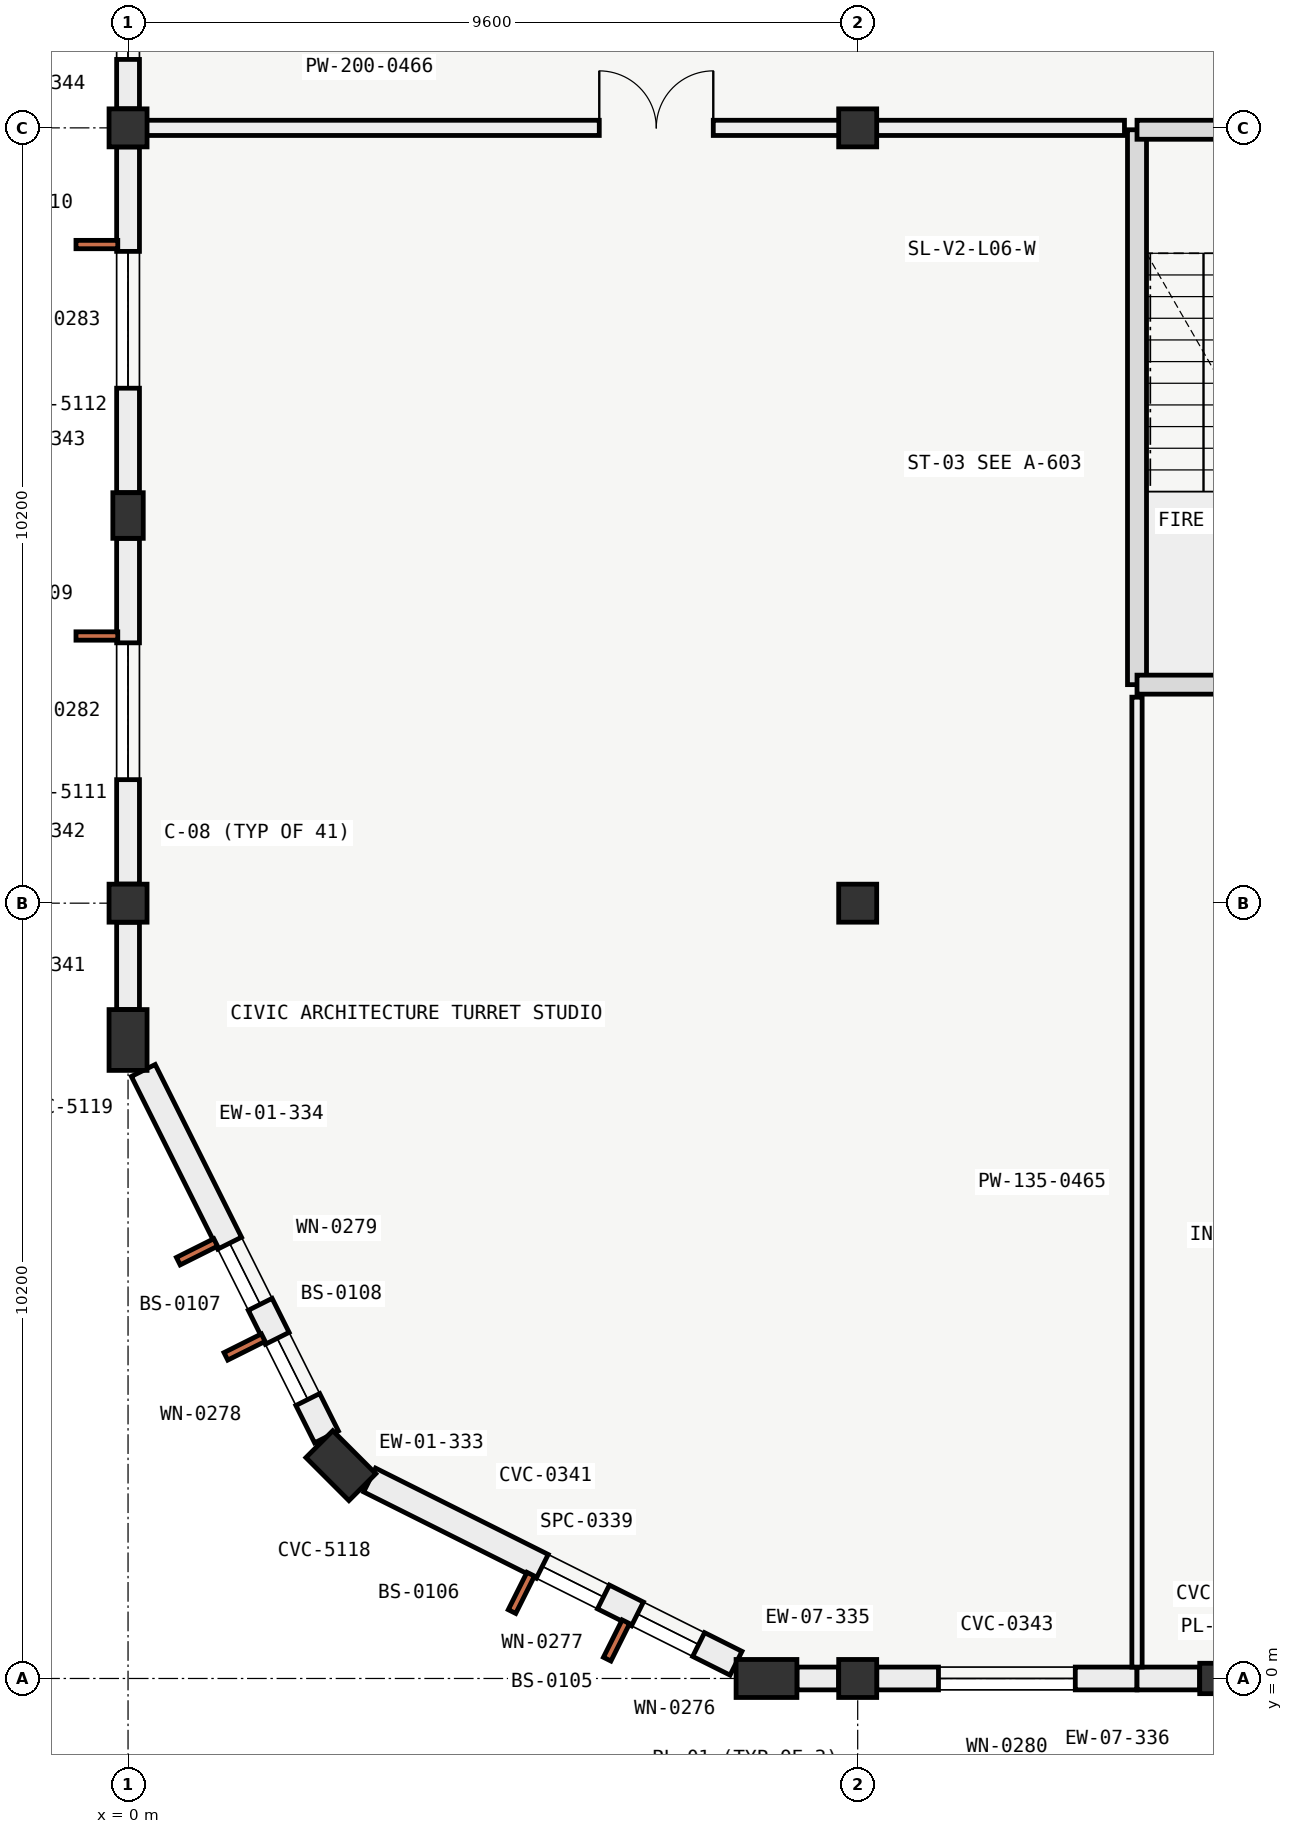
"""IFC4 building model, lengths in metres.
Left out: names, types, materials, properties, quantities, classifications, styles, units other than length and angle.
Written with IfcOpenShell. Run it as: python <this file> out.ifc"""

import sys

from ifc_helpers import new_model, si_unit, direction, frame, frame_2d, origin, origin_2d, place, context, subcontext, project, spatial, rectangle, extrude, element, fill, save


model = new_model("IFC4")
c1 = context("Model", 3, precision=1e-05, world=origin(), true_north=direction((0.0, 1.0)))
c2 = subcontext(c1, "Body", "Model", "MODEL_VIEW")
j1 = project(units=[si_unit("LENGTHUNIT", "METRE"), si_unit("PLANEANGLEUNIT", "RADIAN")], contexts=[c1])
p1 = place(None, origin())
s1 = spatial("IfcSite", under=j1, at=p1, CompositionType="ELEMENT")
p2 = place(p1, origin())
s2 = spatial("IfcBuilding", under=s1, at=p2, CompositionType="ELEMENT")
p3 = place(p2, frame((0.0, 0.0, 26.4)))
s3 = spatial("IfcBuildingStorey", under=s2, at=p3, CompositionType="ELEMENT", Elevation=26.4)
for number, where, z_axis, x_axis in (
    (1, (0.0, 10.2, 0.0), (0.0, 0.0, 1.0), (1.0, 0.0, 0.0)),
    (2, (0.0, 20.4, 0.0), (0.0, 0.0, 1.0), (1.0, 0.0, 0.0)),
    (3, (9.6, 0.0, 0.0), (0.0, 0.0, 1.0), (1.0, 0.0, 0.0)),
    (4, (9.6, 10.2, 0.0), (0.0, 0.0, 1.0), (1.0, 0.0, 0.0)),
    (5, (9.6, 20.4, 0.0), (0.0, 0.0, 1.0), (1.0, 0.0, 0.0)),
):
    element("IfcColumn", number, at=place(p3, frame(where, z_axis=z_axis, x_axis=x_axis)), inside=s3, PredefinedType="COLUMN", context=c2, shape_type="SweptSolid", body=[
        extrude(rectangle(XDim=0.5, YDim=0.5, at=origin_2d()), origin(), (0.0, 0.0, 1.0), 4.2),
    ])
for number, where, z_axis, x_axis in (
    (6, (8.4, 0.0, 0.0), (0.0, 0.0, 1.0), (0.0, 1.0, 0.0)),
    (7, (2.8, 2.8, 0.0), (0.0, 0.0, 1.0), (0.707, 0.707, 0.0)),
    (8, (0.0, 8.4, 0.0), (0.0, 0.0, 1.0), (1.0, 0.0, 0.0)),
):
    element("IfcColumn", number, at=place(p3, frame(where, z_axis=z_axis, x_axis=x_axis)), inside=s3, PredefinedType="PILASTER", context=c2, shape_type="SweptSolid", body=[
        extrude(rectangle(XDim=0.5, YDim=0.8, at=origin_2d()), origin(), (0.0, 0.0, 1.0), 4.2),
    ])
for number, where, z_axis, x_axis in (
    (9, (14.4, 0.0, 0.0), (0.0, 0.0, 1.0), (0.0, 1.0, 0.0)),
    (10, (0.0, 15.3, 0.0), (0.0, 0.0, 1.0), (1.0, 0.0, 0.0)),
):
    element("IfcColumn", number, at=place(p3, frame(where, z_axis=z_axis, x_axis=x_axis)), inside=s3, PredefinedType="PILASTER", context=c2, shape_type="SweptSolid", body=[
        extrude(rectangle(XDim=0.4, YDim=0.6, at=origin_2d()), origin(), (0.0, 0.0, 1.0), 4.2),
    ])
p4 = place(p3, frame((7.999, 0.2, 0.0), z_axis=(0.0, 0.0, 1.0), x_axis=(-0.894418132042, 0.447231712958, 0.0)))
e11 = element("IfcWall", 11, at=p4, inside=s3, PredefinedType="SOLIDWALL", context=c2, shape_type="SweptSolid", body=[
    extrude(rectangle(XDim=5.39, YDim=0.35, at=frame_2d((2.695, 0.0))), origin(), (0.0, 0.0, 1.0), 3.25),
])
p5 = place(p4, frame((0.55, 0.0, 0.7)))
e12 = element("IfcOpeningElement", 12, at=p5, cuts=e11, PredefinedType="OPENING", context=c2, shape_type="SweptSolid", body=[
    extrude(rectangle(XDim=0.9, YDim=2.2, at=frame_2d((0.45, 1.1))), frame((0.0, 0.185, 0.0), z_axis=(0.0, -1.0, 0.0), x_axis=(1.0, 0.0, 0.0)), (0.0, 0.0, 1.0), 0.37),
])
p6 = place(p4, frame((1.95, 0.0, 0.7)))
e13 = element("IfcOpeningElement", 13, at=p6, cuts=e11, PredefinedType="OPENING", context=c2, shape_type="SweptSolid", body=[
    extrude(rectangle(XDim=0.9, YDim=2.2, at=frame_2d((0.45, 1.1))), frame((0.0, 0.185, 0.0), z_axis=(0.0, -1.0, 0.0), x_axis=(1.0, 0.0, 0.0)), (0.0, 0.0, 1.0), 0.37),
])
p7 = place(p3, frame((2.611, 3.178, 0.0), z_axis=(0.0, 0.0, 1.0), x_axis=(-0.447231712958, 0.894418132042, 0.0)))
e14 = element("IfcWall", 14, at=p7, inside=s3, PredefinedType="SOLIDWALL", context=c2, shape_type="SweptSolid", body=[
    extrude(rectangle(XDim=5.39, YDim=0.35, at=frame_2d((2.695, 0.0))), origin(), (0.0, 0.0, 1.0), 3.25),
])
p8 = place(p7, frame((0.55, 0.0, 0.7)))
e15 = element("IfcOpeningElement", 15, at=p8, cuts=e14, PredefinedType="OPENING", context=c2, shape_type="SweptSolid", body=[
    extrude(rectangle(XDim=0.9, YDim=2.2, at=frame_2d((0.45, 1.1))), frame((0.0, 0.185, 0.0), z_axis=(0.0, -1.0, 0.0), x_axis=(1.0, 0.0, 0.0)), (0.0, 0.0, 1.0), 0.37),
])
p9 = place(p7, frame((1.95, 0.0, 0.7)))
e16 = element("IfcOpeningElement", 16, at=p9, cuts=e14, PredefinedType="OPENING", context=c2, shape_type="SweptSolid", body=[
    extrude(rectangle(XDim=0.9, YDim=2.2, at=frame_2d((0.45, 1.1))), frame((0.0, 0.185, 0.0), z_axis=(0.0, -1.0, 0.0), x_axis=(1.0, 0.0, 0.0)), (0.0, 0.0, 1.0), 0.37),
])
p10 = place(p3, frame((9.349, 0.0, 0.0), z_axis=(0.0, 0.0, 1.0), x_axis=(-1.0, 0.0, 0.0)))
e17 = element("IfcWall", 17, at=p10, inside=s3, PredefinedType="SOLIDWALL", context=c2, shape_type="SweptSolid", body=[
    extrude(rectangle(XDim=0.548, YDim=0.3, at=frame_2d((0.274, 0.0))), origin(), (0.0, 0.0, 1.0), 3.25),
])
p11 = place(p3, frame((13.275, 0.0, 0.0), z_axis=(0.0, 0.0, 1.0), x_axis=(-1.0, 0.0, 0.0)))
e18 = element("IfcWall", 18, at=p11, inside=s3, PredefinedType="SOLIDWALL", context=c2, shape_type="SweptSolid", body=[
    extrude(rectangle(XDim=3.424, YDim=0.3, at=frame_2d((1.712, 0.0))), origin(), (0.0, 0.0, 1.0), 3.25),
])
p12 = place(p11, frame((0.812, 0.0, 0.8)))
e19 = element("IfcOpeningElement", 19, at=p12, cuts=e18, PredefinedType="OPENING", context=c2, shape_type="SweptSolid", body=[
    extrude(rectangle(XDim=1.8, YDim=2.1, at=frame_2d((0.9, 1.05))), frame((0.0, 0.16, 0.0), z_axis=(0.0, -1.0, 0.0), x_axis=(1.0, 0.0, 0.0)), (0.0, 0.0, 1.0), 0.32),
])
p13 = place(p3, frame((14.099, 0.0, 0.0), z_axis=(0.0, 0.0, 1.0), x_axis=(-1.0, 0.0, 0.0)))
e20 = element("IfcWall", 20, at=p13, inside=s3, PredefinedType="SOLIDWALL", context=c2, shape_type="SweptSolid", body=[
    extrude(rectangle(XDim=0.824, YDim=0.3, at=frame_2d((0.412, 0.0))), origin(), (0.0, 0.0, 1.0), 3.25),
])
p14 = place(p3, frame((0.0, 8.801, 0.0), z_axis=(0.0, 0.0, 1.0), x_axis=(0.0, 1.0, 0.0)))
e21 = element("IfcWall", 21, at=p14, inside=s3, PredefinedType="SOLIDWALL", context=c2, shape_type="SweptSolid", body=[
    extrude(rectangle(XDim=1.148, YDim=0.3, at=frame_2d((0.574, 0.0))), origin(), (0.0, 0.0, 1.0), 3.25),
])
p15 = place(p3, frame((0.0, 10.451, 0.0), z_axis=(0.0, 0.0, 1.0), x_axis=(0.0, 1.0, 0.0)))
e22 = element("IfcWall", 22, at=p15, inside=s3, PredefinedType="SOLIDWALL", context=c2, shape_type="SweptSolid", body=[
    extrude(rectangle(XDim=4.548, YDim=0.3, at=frame_2d((2.274, 0.0))), origin(), (0.0, 0.0, 1.0), 3.25),
])
p16 = place(p15, frame((1.374, 0.0, 0.85)))
e23 = element("IfcOpeningElement", 23, at=p16, cuts=e22, PredefinedType="OPENING", context=c2, shape_type="SweptSolid", body=[
    extrude(rectangle(XDim=1.8, YDim=2.1, at=frame_2d((0.9, 1.05))), frame((0.0, 0.16, 0.0), z_axis=(0.0, -1.0, 0.0), x_axis=(1.0, 0.0, 0.0)), (0.0, 0.0, 1.0), 0.32),
])
p17 = place(p3, frame((0.0, 15.601, 0.0), z_axis=(0.0, 0.0, 1.0), x_axis=(0.0, 1.0, 0.0)))
e24 = element("IfcWall", 24, at=p17, inside=s3, PredefinedType="SOLIDWALL", context=c2, shape_type="SweptSolid", body=[
    extrude(rectangle(XDim=4.548, YDim=0.3, at=frame_2d((2.274, 0.0))), origin(), (0.0, 0.0, 1.0), 3.25),
])
p18 = place(p17, frame((1.374, 0.0, 0.85)))
e25 = element("IfcOpeningElement", 25, at=p18, cuts=e24, PredefinedType="OPENING", context=c2, shape_type="SweptSolid", body=[
    extrude(rectangle(XDim=1.8, YDim=2.1, at=frame_2d((0.9, 1.05))), frame((0.0, 0.16, 0.0), z_axis=(0.0, -1.0, 0.0), x_axis=(1.0, 0.0, 0.0)), (0.0, 0.0, 1.0), 0.32),
])
p19 = place(p3, frame((0.0, 20.651, 0.0), z_axis=(0.0, 0.0, 1.0), x_axis=(0.0, 1.0, 0.0)))
e26 = element("IfcWall", 26, at=p19, inside=s3, PredefinedType="SOLIDWALL", context=c2, shape_type="SweptSolid", body=[
    extrude(rectangle(XDim=3.299, YDim=0.3, at=frame_2d((1.649, 0.0))), origin(), (0.0, 0.0, 1.0), 3.25),
])
p20 = place(p19, frame((0.649, 0.0, 0.75)))
e27 = element("IfcOpeningElement", 27, at=p20, cuts=e26, PredefinedType="OPENING", context=c2, shape_type="SweptSolid", body=[
    extrude(rectangle(XDim=2.0, YDim=1.35, at=frame_2d((1.0, 0.675))), frame((0.0, 0.16, 0.0), z_axis=(0.0, -1.0, 0.0), x_axis=(1.0, 0.0, 0.0)), (0.0, 0.0, 1.0), 0.32),
])
p21 = place(p3, frame((13.275, 20.375, 0.0), z_axis=(0.0, 0.0, 1.0), x_axis=(0.0, -1.0, 0.0)))
e28 = element("IfcWall", 28, at=p21, inside=s3, PredefinedType="SOLIDWALL", context=c2, shape_type="SweptSolid", body=[
    extrude(rectangle(XDim=7.3, YDim=0.25, at=frame_2d((3.65, 0.0))), origin(), (0.0, 0.0, 1.0), 3.975),
])
p22 = place(p3, frame((13.275, 13.075, 0.0), z_axis=(0.0, 0.0, 1.0), x_axis=(1.0, 0.0, 0.0)))
e29 = element("IfcWall", 29, at=p22, inside=s3, PredefinedType="SOLIDWALL", context=c2, shape_type="SweptSolid", body=[
    extrude(rectangle(XDim=3.45, YDim=0.25, at=frame_2d((1.725, 0.0))), origin(), (0.0, 0.0, 1.0), 3.975),
])
p23 = place(p3, frame((16.725, 20.375, 0.0), z_axis=(0.0, 0.0, 1.0), x_axis=(-1.0, 0.0, 0.0)))
e30 = element("IfcWall", 30, at=p23, inside=s3, PredefinedType="SOLIDWALL", context=c2, shape_type="SweptSolid", body=[
    extrude(rectangle(XDim=3.45, YDim=0.25, at=frame_2d((1.725, 0.0))), origin(), (0.0, 0.0, 1.0), 3.975),
])
p24 = place(p23, frame((1.175, 0.0, 0.0)))
e31 = element("IfcOpeningElement", 31, at=p24, cuts=e30, PredefinedType="OPENING", context=c2, shape_type="SweptSolid", body=[
    extrude(rectangle(XDim=1.1, YDim=2.2, at=frame_2d((0.55, 1.1))), frame((0.0, 0.135, 0.0), z_axis=(0.0, -1.0, 0.0), x_axis=(1.0, 0.0, 0.0)), (0.0, 0.0, 1.0), 0.27),
])
p25 = place(p3, frame((13.275, 0.15, 0.0), z_axis=(0.0, 0.0, 1.0), x_axis=(0.0, 1.0, 0.0)))
e32 = element("IfcWall", 32, at=p25, inside=s3, PredefinedType="PARTITIONING", context=c2, shape_type="SweptSolid", body=[
    extrude(rectangle(XDim=12.76, YDim=0.135, at=frame_2d((6.38, 0.0))), origin(), (0.0, 0.0, 1.0), 3.405),
])
p26 = place(p3, frame((0.15, 20.4, 0.0), z_axis=(0.0, 0.0, 1.0), x_axis=(1.0, 0.0, 0.0)))
e33 = element("IfcWall", 33, at=p26, inside=s3, PredefinedType="PARTITIONING", context=c2, shape_type="SweptSolid", body=[
    extrude(rectangle(XDim=12.96, YDim=0.2, at=frame_2d((6.48, 0.0))), origin(), (0.0, 0.0, 1.0), 3.305),
])
p27 = place(p26, frame((6.05, 0.0, 0.0)))
e34 = element("IfcOpeningElement", 34, at=p27, cuts=e33, PredefinedType="OPENING", context=c2, shape_type="SweptSolid", body=[
    extrude(rectangle(XDim=1.5, YDim=2.2, at=frame_2d((0.75, 1.1))), frame((0.0, 0.11, 0.0), z_axis=(0.0, -1.0, 0.0), x_axis=(1.0, 0.0, 0.0)), (0.0, 0.0, 1.0), 0.22),
])
p28 = place(p5, origin())
e35 = element("IfcWindow", 35, at=p28, inside=s3, PartitioningType="SINGLE_PANEL", PredefinedType="WINDOW", context=c2, shape_type="SweptSolid", body=[
    extrude(rectangle(XDim=0.9, YDim=2.2, at=frame_2d((0.45, 1.1))), frame((0.0, 0.03, 0.0), z_axis=(0.0, -1.0, 0.0), x_axis=(1.0, 0.0, 0.0)), (0.0, 0.0, 1.0), 0.06),
])
fill(e12, e35)
p29 = place(p6, origin())
e36 = element("IfcWindow", 36, at=p29, inside=s3, PartitioningType="SINGLE_PANEL", PredefinedType="WINDOW", context=c2, shape_type="SweptSolid", body=[
    extrude(rectangle(XDim=0.9, YDim=2.2, at=frame_2d((0.45, 1.1))), frame((0.0, 0.03, 0.0), z_axis=(0.0, -1.0, 0.0), x_axis=(1.0, 0.0, 0.0)), (0.0, 0.0, 1.0), 0.06),
])
fill(e13, e36)
p30 = place(p8, origin())
e37 = element("IfcWindow", 37, at=p30, inside=s3, PartitioningType="SINGLE_PANEL", PredefinedType="WINDOW", context=c2, shape_type="SweptSolid", body=[
    extrude(rectangle(XDim=0.9, YDim=2.2, at=frame_2d((0.45, 1.1))), frame((0.0, 0.03, 0.0), z_axis=(0.0, -1.0, 0.0), x_axis=(1.0, 0.0, 0.0)), (0.0, 0.0, 1.0), 0.06),
])
fill(e15, e37)
p31 = place(p9, origin())
e38 = element("IfcWindow", 38, at=p31, inside=s3, PartitioningType="SINGLE_PANEL", PredefinedType="WINDOW", context=c2, shape_type="SweptSolid", body=[
    extrude(rectangle(XDim=0.9, YDim=2.2, at=frame_2d((0.45, 1.1))), frame((0.0, 0.03, 0.0), z_axis=(0.0, -1.0, 0.0), x_axis=(1.0, 0.0, 0.0)), (0.0, 0.0, 1.0), 0.06),
])
fill(e16, e38)
p32 = place(p12, origin())
e39 = element("IfcWindow", 39, at=p32, inside=s3, PartitioningType="SINGLE_PANEL", PredefinedType="WINDOW", context=c2, shape_type="SweptSolid", body=[
    extrude(rectangle(XDim=1.8, YDim=2.1, at=frame_2d((0.9, 1.05))), frame((0.0, 0.03, 0.0), z_axis=(0.0, -1.0, 0.0), x_axis=(1.0, 0.0, 0.0)), (0.0, 0.0, 1.0), 0.06),
])
fill(e19, e39)
p33 = place(p16, origin())
e40 = element("IfcWindow", 40, at=p33, inside=s3, PartitioningType="SINGLE_PANEL", PredefinedType="WINDOW", context=c2, shape_type="SweptSolid", body=[
    extrude(rectangle(XDim=1.8, YDim=2.1, at=frame_2d((0.9, 1.05))), frame((0.0, 0.03, 0.0), z_axis=(0.0, -1.0, 0.0), x_axis=(1.0, 0.0, 0.0)), (0.0, 0.0, 1.0), 0.06),
])
fill(e23, e40)
p34 = place(p18, origin())
e41 = element("IfcWindow", 41, at=p34, inside=s3, PartitioningType="SINGLE_PANEL", PredefinedType="WINDOW", context=c2, shape_type="SweptSolid", body=[
    extrude(rectangle(XDim=1.8, YDim=2.1, at=frame_2d((0.9, 1.05))), frame((0.0, 0.03, 0.0), z_axis=(0.0, -1.0, 0.0), x_axis=(1.0, 0.0, 0.0)), (0.0, 0.0, 1.0), 0.06),
])
fill(e25, e41)
p35 = place(p20, origin())
e42 = element("IfcWindow", 42, at=p35, inside=s3, PartitioningType="SINGLE_PANEL", PredefinedType="WINDOW", context=c2, shape_type="SweptSolid", body=[
    extrude(rectangle(XDim=2.0, YDim=1.35, at=frame_2d((1.0, 0.675))), frame((0.0, 0.03, 0.0), z_axis=(0.0, -1.0, 0.0), x_axis=(1.0, 0.0, 0.0)), (0.0, 0.0, 1.0), 0.06),
])
fill(e27, e42)
p36 = place(p27, origin())
e43 = element("IfcDoor", 43, at=p36, inside=s3, OperationType="DOUBLE_DOOR_SINGLE_SWING", PredefinedType="DOOR", context=c2, shape_type="SweptSolid", body=[
    extrude(rectangle(XDim=1.5, YDim=2.2, at=frame_2d((0.75, 1.1))), frame((0.0, 0.025, 0.0), z_axis=(0.0, -1.0, 0.0), x_axis=(1.0, 0.0, 0.0)), (0.0, 0.0, 1.0), 0.05),
])
fill(e34, e43)
save(model, sys.argv[1])
